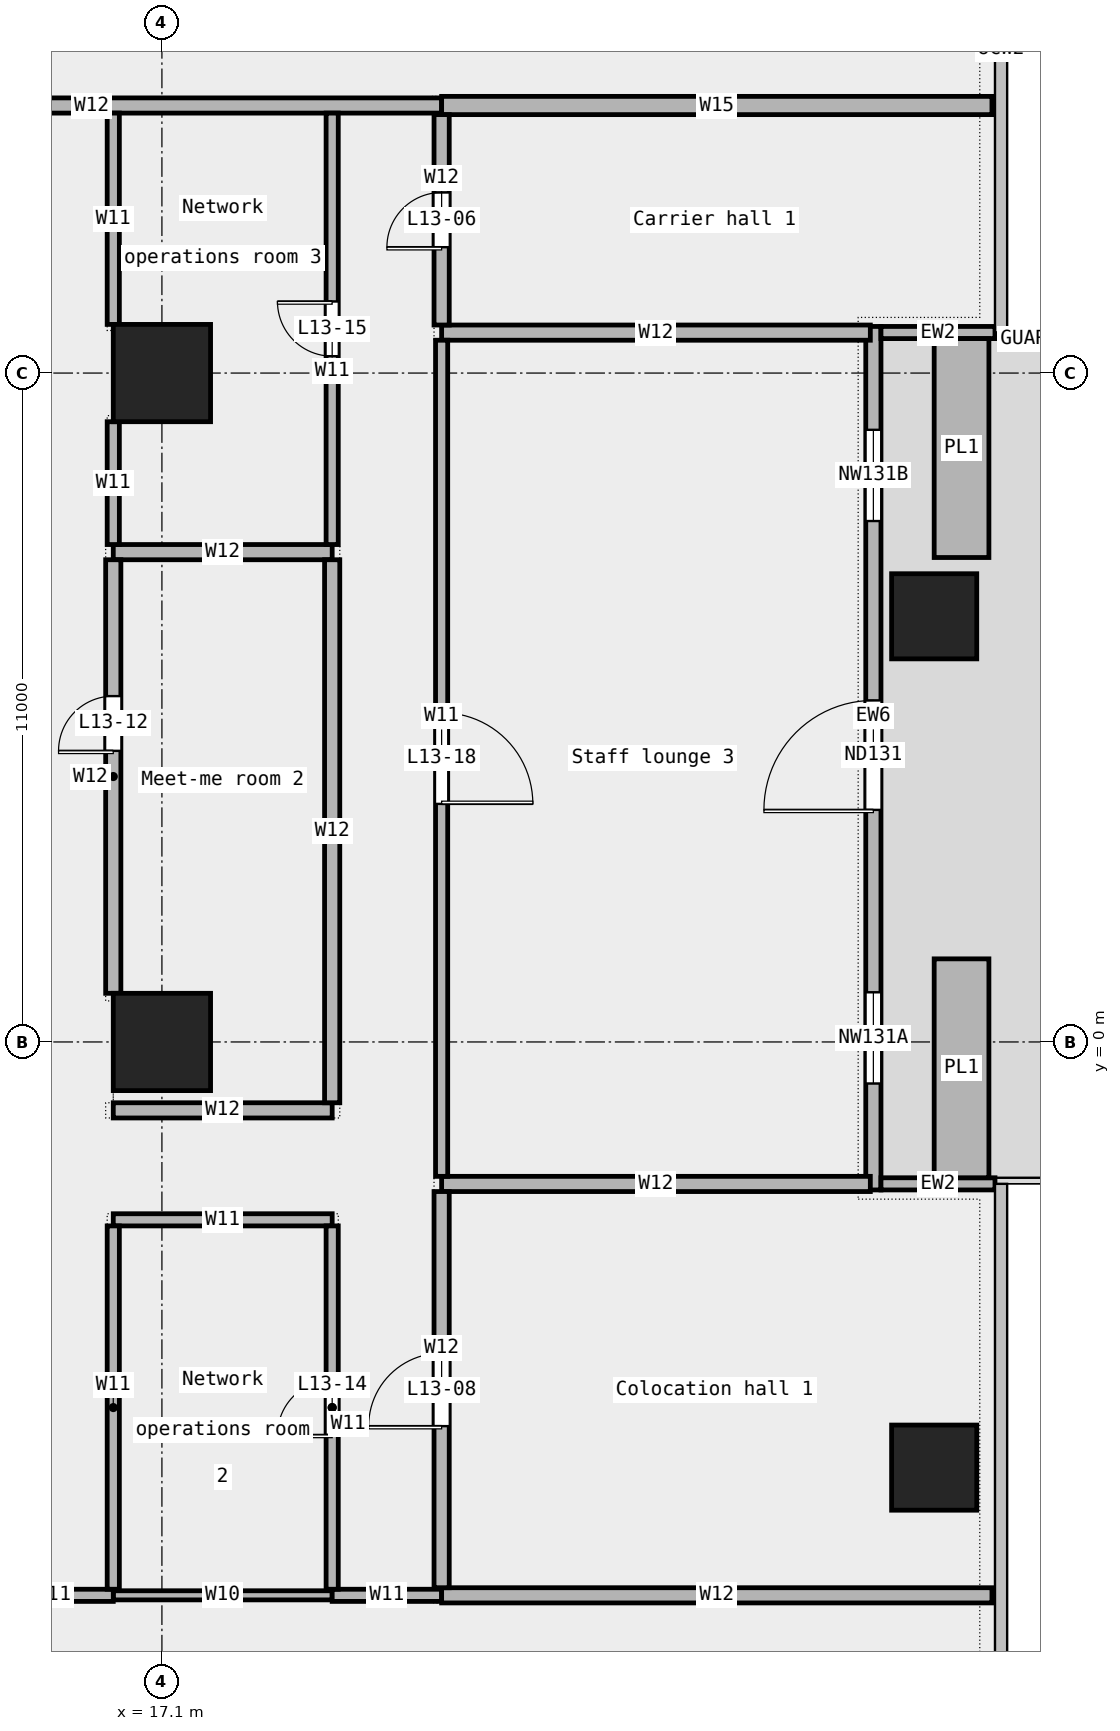
"""IFC4 building model, lengths in metres.
Left out: names, types, materials, properties, quantities, classifications, styles, units other than length and angle.
Written with IfcOpenShell. Run it as: python <this file> out.ifc"""

import sys

from ifc_helpers import new_model, si_unit, direction, frame, frame_2d, origin, origin_2d, place, context, subcontext, project, spatial, rectangle, extrude, element, fill, save


model = new_model("IFC4")
c1 = context("Model", 3, precision=1e-05, world=origin(), true_north=direction((0.0, 1.0)))
c2 = subcontext(c1, "Body", "Model", "MODEL_VIEW")
j1 = project(units=[si_unit("LENGTHUNIT", "METRE"), si_unit("PLANEANGLEUNIT", "RADIAN")], contexts=[c1])
p1 = place(None, origin())
s1 = spatial("IfcSite", under=j1, at=p1, CompositionType="ELEMENT")
p2 = place(p1, origin())
s2 = spatial("IfcBuilding", under=s1, at=p2, CompositionType="ELEMENT")
p3 = place(p2, frame((0.0, 0.0, 69.4)))
s3 = spatial("IfcBuildingStorey", under=s2, at=p3, CompositionType="ELEMENT", Elevation=69.4)
for number, where, z_axis, x_axis in (
    (1, (29.8, -7.0, 0.0), (0.0, 0.0, 1.0), (1.0, 0.0, 0.0)),
    (2, (29.8, 7.0, 0.0), (0.0, 0.0, 1.0), (1.0, 0.0, 0.0)),
):
    element("IfcColumn", number, at=place(p3, frame(where, z_axis=z_axis, x_axis=x_axis)), inside=s3, PredefinedType="COLUMN", context=c2, shape_type="SweptSolid", body=[
        extrude(rectangle(XDim=1.4, YDim=1.4, at=origin_2d()), origin(), (0.0, 0.0, 1.0), 4.35),
    ])
for number, where, z_axis, x_axis in (
    (3, (17.1, 0.0, 0.0), (0.0, 0.0, 1.0), (1.0, 0.0, 0.0)),
    (4, (17.1, 11.0, 0.0), (0.0, 0.0, 1.0), (1.0, 0.0, 0.0)),
):
    element("IfcColumn", number, at=place(p3, frame(where, z_axis=z_axis, x_axis=x_axis)), inside=s3, PredefinedType="COLUMN", context=c2, shape_type="SweptSolid", body=[
        extrude(rectangle(XDim=1.6, YDim=1.6, at=origin_2d()), origin(), (0.0, 0.0, 1.0), 4.35),
    ])
p4 = place(p3, frame((28.8, -2.433, 0.0), z_axis=(0.0, 0.0, 1.0), x_axis=(0.0, 1.0, 0.0)))
e5 = element("IfcWall", 5, at=p4, inside=s3, PredefinedType="STANDARD", context=c2, shape_type="SweptSolid", body=[
    extrude(rectangle(XDim=14.2, YDim=0.25, at=frame_2d((7.1, 0.0))), origin(), (0.0, 0.0, 1.0), 4.35),
])
p5 = place(p4, frame((1.75, 0.0, 0.45)))
e6 = element("IfcOpeningElement", 6, at=p5, cuts=e5, PredefinedType="OPENING", context=c2, shape_type="SweptSolid", body=[
    extrude(rectangle(XDim=1.5, YDim=3.0, at=frame_2d((0.75, 1.5))), frame((0.0, 0.137, 0.0), z_axis=(0.0, -1.0, 0.0), x_axis=(1.0, 0.0, 0.0)), (0.0, 0.0, 1.0), 0.274),
])
p6 = place(p4, frame((6.25, 0.0, 0.0)))
e7 = element("IfcOpeningElement", 7, at=p6, cuts=e5, PredefinedType="OPENING", context=c2, shape_type="SweptSolid", body=[
    extrude(rectangle(XDim=1.8, YDim=2.4, at=frame_2d((0.9, 1.2))), frame((0.0, 0.137, 0.0), z_axis=(0.0, -1.0, 0.0), x_axis=(1.0, 0.0, 0.0)), (0.0, 0.0, 1.0), 0.274),
])
p7 = place(p4, frame((11.0, 0.0, 0.45)))
e8 = element("IfcOpeningElement", 8, at=p7, cuts=e5, PredefinedType="OPENING", context=c2, shape_type="SweptSolid", body=[
    extrude(rectangle(XDim=1.5, YDim=3.0, at=frame_2d((0.75, 1.5))), frame((0.0, 0.137, 0.0), z_axis=(0.0, -1.0, 0.0), x_axis=(1.0, 0.0, 0.0)), (0.0, 0.0, 1.0), 0.274),
])
for number, where, z_axis, x_axis in (
    (9, (30.8, -2.333, 0.0), (0.0, 0.0, 1.0), (-1.0, 0.0, 0.0)),
    (10, (30.8, 11.667, 0.0), (0.0, 0.0, 1.0), (-1.0, 0.0, 0.0)),
):
    element("IfcWall", number, at=place(p3, frame(where, z_axis=z_axis, x_axis=x_axis)), inside=s3, PredefinedType="STANDARD", context=c2, shape_type="SweptSolid", body=[
        extrude(rectangle(XDim=1.875, YDim=0.2, at=frame_2d((0.938, 0.0))), origin(), (0.0, 0.0, 1.0), 4.35),
    ])
for number, where, z_axis, x_axis in (
    (11, (30.25, -2.233, 0.0), (0.0, 0.0, 1.0), (0.0, 1.0, 0.0)),
    (12, (30.25, 7.967, 0.0), (0.0, 0.0, 1.0), (0.0, 1.0, 0.0)),
):
    element("IfcWall", number, at=place(p3, frame(where, z_axis=z_axis, x_axis=x_axis)), inside=s3, PredefinedType="STANDARD", context=c2, shape_type="SweptSolid", body=[
        extrude(rectangle(XDim=3.6, YDim=0.9, at=frame_2d((1.8, 0.0))), origin(), (0.0, 0.0, 1.0), 0.7),
    ])
p8 = place(p3, frame((16.3, -9.1, 0.0), z_axis=(0.0, 0.0, 1.0), x_axis=(1.0, 0.0, 0.0)))
e13 = element("IfcWall", 13, at=p8, inside=s3, PredefinedType="PARTITIONING", context=c2, shape_type="SweptSolid", body=[
    extrude(rectangle(XDim=3.6, YDim=0.15, at=frame_2d((1.8, 0.0))), origin(), (0.0, 0.0, 1.0), 4.35),
])
p9 = place(p3, frame((14.34, -9.1, 0.0), z_axis=(0.0, 0.0, 1.0), x_axis=(1.0, 0.0, 0.0)))
e14 = element("IfcWall", 14, at=p9, inside=s3, PredefinedType="PARTITIONING", context=c2, shape_type="SweptSolid", body=[
    extrude(rectangle(XDim=1.96, YDim=0.2, at=frame_2d((0.98, 0.0))), origin(), (0.0, 0.0, 1.0), 4.35),
])
p10 = place(p3, frame((19.9, -9.1, 0.0), z_axis=(0.0, 0.0, 1.0), x_axis=(1.0, 0.0, 0.0)))
e15 = element("IfcWall", 15, at=p10, inside=s3, PredefinedType="PARTITIONING", context=c2, shape_type="SweptSolid", body=[
    extrude(rectangle(XDim=1.8, YDim=0.2, at=frame_2d((0.9, 0.0))), origin(), (0.0, 0.0, 1.0), 4.35),
])
p11 = place(p3, frame((21.7, -9.1, 0.0), z_axis=(0.0, 0.0, 1.0), x_axis=(1.0, 0.0, 0.0)))
e16 = element("IfcWall", 16, at=p11, inside=s3, PredefinedType="PARTITIONING", context=c2, shape_type="SweptSolid", body=[
    extrude(rectangle(XDim=9.05, YDim=0.25, at=frame_2d((4.525, 0.0))), origin(), (0.0, 0.0, 1.0), 4.35),
])
p12 = place(p3, frame((16.3, -2.925, 0.0), z_axis=(0.0, 0.0, 1.0), x_axis=(1.0, 0.0, 0.0)))
e17 = element("IfcWall", 17, at=p12, inside=s3, PredefinedType="PARTITIONING", context=c2, shape_type="SweptSolid", body=[
    extrude(rectangle(XDim=3.6, YDim=0.2, at=frame_2d((1.8, 0.0))), origin(), (0.0, 0.0, 1.0), 4.35),
])
p13 = place(p3, frame((21.7, -2.335, 0.0), z_axis=(0.0, 0.0, 1.0), x_axis=(1.0, 0.0, 0.0)))
e18 = element("IfcWall", 18, at=p13, inside=s3, PredefinedType="PARTITIONING", context=c2, shape_type="SweptSolid", body=[
    extrude(rectangle(XDim=7.05, YDim=0.25, at=frame_2d((3.525, 0.0))), origin(), (0.0, 0.0, 1.0), 4.35),
])
for number, where, z_axis, x_axis in (
    (19, (16.3, -1.125, 0.0), (0.0, 0.0, 1.0), (1.0, 0.0, 0.0)),
    (20, (16.3, 8.055, 0.0), (0.0, 0.0, 1.0), (1.0, 0.0, 0.0)),
):
    element("IfcWall", number, at=place(p3, frame(where, z_axis=z_axis, x_axis=x_axis)), inside=s3, PredefinedType="PARTITIONING", context=c2, shape_type="SweptSolid", body=[
        extrude(rectangle(XDim=3.6, YDim=0.25, at=frame_2d((1.8, 0.0))), origin(), (0.0, 0.0, 1.0), 4.35),
    ])
p14 = place(p3, frame((21.7, 11.665, 0.0), z_axis=(0.0, 0.0, 1.0), x_axis=(1.0, 0.0, 0.0)))
e21 = element("IfcWall", 21, at=p14, inside=s3, PredefinedType="PARTITIONING", context=c2, shape_type="SweptSolid", body=[
    extrude(rectangle(XDim=7.05, YDim=0.25, at=frame_2d((3.525, 0.0))), origin(), (0.0, 0.0, 1.0), 4.35),
])
p15 = place(p3, frame((10.185, 15.4, 0.0), z_axis=(0.0, 0.0, 1.0), x_axis=(1.0, 0.0, 0.0)))
e22 = element("IfcWall", 22, at=p15, inside=s3, PredefinedType="PARTITIONING", context=c2, shape_type="SweptSolid", body=[
    extrude(rectangle(XDim=11.515, YDim=0.25, at=frame_2d((5.757, 0.0))), origin(), (0.0, 0.0, 1.0), 4.35),
])
p16 = place(p15, frame((2.157, 0.0, 0.0)))
e23 = element("IfcOpeningElement", 23, at=p16, cuts=e22, PredefinedType="OPENING", context=c2, shape_type="SweptSolid", body=[
    extrude(rectangle(XDim=1.8, YDim=2.1, at=frame_2d((0.9, 1.05))), frame((0.0, 0.137, 0.0), z_axis=(0.0, -1.0, 0.0), x_axis=(1.0, 0.0, 0.0)), (0.0, 0.0, 1.0), 0.274),
])
p17 = place(p3, frame((21.7, 15.4, 0.0), z_axis=(0.0, 0.0, 1.0), x_axis=(1.0, 0.0, 0.0)))
e24 = element("IfcWall", 24, at=p17, inside=s3, PredefinedType="PARTITIONING", context=c2, shape_type="SweptSolid", body=[
    extrude(rectangle(XDim=9.05, YDim=0.3, at=frame_2d((4.525, 0.0))), origin(), (0.0, 0.0, 1.0), 4.35),
])
p18 = place(p3, frame((16.3, -9.0, 0.0), z_axis=(0.0, 0.0, 1.0), x_axis=(0.0, 1.0, 0.0)))
e25 = element("IfcWall", 25, at=p18, inside=s3, PredefinedType="PARTITIONING", context=c2, shape_type="SweptSolid", body=[
    extrude(rectangle(XDim=5.975, YDim=0.2, at=frame_2d((2.988, 0.0))), origin(), (0.0, 0.0, 1.0), 4.35),
])
p19 = place(p3, frame((16.3, 8.18, 0.0), z_axis=(0.0, 0.0, 1.0), x_axis=(0.0, 1.0, 0.0)))
e26 = element("IfcWall", 26, at=p19, inside=s3, PredefinedType="PARTITIONING", context=c2, shape_type="SweptSolid", body=[
    extrude(rectangle(XDim=2.02, YDim=0.2, at=frame_2d((1.01, 0.0))), origin(), (0.0, 0.0, 1.0), 4.35),
])
p20 = place(p3, frame((16.3, 11.8, 0.0), z_axis=(0.0, 0.0, 1.0), x_axis=(0.0, 1.0, 0.0)))
e27 = element("IfcWall", 27, at=p20, inside=s3, PredefinedType="PARTITIONING", context=c2, shape_type="SweptSolid", body=[
    extrude(rectangle(XDim=3.475, YDim=0.2, at=frame_2d((1.737, 0.0))), origin(), (0.0, 0.0, 1.0), 4.35),
])
p21 = place(p3, frame((16.3, 0.8, 0.0), z_axis=(0.0, 0.0, 1.0), x_axis=(0.0, 1.0, 0.0)))
e28 = element("IfcWall", 28, at=p21, inside=s3, PredefinedType="PARTITIONING", context=c2, shape_type="SweptSolid", body=[
    extrude(rectangle(XDim=7.13, YDim=0.25, at=frame_2d((3.565, 0.0))), origin(), (0.0, 0.0, 1.0), 4.35),
])
p22 = place(p21, frame((3.988, 0.0, 0.0)))
e29 = element("IfcOpeningElement", 29, at=p22, cuts=e28, PredefinedType="OPENING", context=c2, shape_type="SweptSolid", body=[
    extrude(rectangle(XDim=0.9, YDim=2.1, at=frame_2d((0.45, 1.05))), frame((0.0, 0.137, 0.0), z_axis=(0.0, -1.0, 0.0), x_axis=(1.0, 0.0, 0.0)), (0.0, 0.0, 1.0), 0.274),
])
p23 = place(p3, frame((19.9, -9.0, 0.0), z_axis=(0.0, 0.0, 1.0), x_axis=(0.0, 1.0, 0.0)))
e30 = element("IfcWall", 30, at=p23, inside=s3, PredefinedType="PARTITIONING", context=c2, shape_type="SweptSolid", body=[
    extrude(rectangle(XDim=5.975, YDim=0.2, at=frame_2d((2.988, 0.0))), origin(), (0.0, 0.0, 1.0), 4.35),
])
p24 = place(p23, frame((2.538, 0.0, 0.0)))
e31 = element("IfcOpeningElement", 31, at=p24, cuts=e30, PredefinedType="OPENING", context=c2, shape_type="SweptSolid", body=[
    extrude(rectangle(XDim=0.9, YDim=2.1, at=frame_2d((0.45, 1.05))), frame((0.0, 0.112, 0.0), z_axis=(0.0, -1.0, 0.0), x_axis=(1.0, 0.0, 0.0)), (0.0, 0.0, 1.0), 0.224),
])
p25 = place(p3, frame((19.9, 8.18, 0.0), z_axis=(0.0, 0.0, 1.0), x_axis=(0.0, 1.0, 0.0)))
e32 = element("IfcWall", 32, at=p25, inside=s3, PredefinedType="PARTITIONING", context=c2, shape_type="SweptSolid", body=[
    extrude(rectangle(XDim=7.095, YDim=0.2, at=frame_2d((3.547, 0.0))), origin(), (0.0, 0.0, 1.0), 4.35),
])
p26 = place(p25, frame((3.097, 0.0, 0.0)))
e33 = element("IfcOpeningElement", 33, at=p26, cuts=e32, PredefinedType="OPENING", context=c2, shape_type="SweptSolid", body=[
    extrude(rectangle(XDim=0.9, YDim=2.1, at=frame_2d((0.45, 1.05))), frame((0.0, 0.112, 0.0), z_axis=(0.0, -1.0, 0.0), x_axis=(1.0, 0.0, 0.0)), (0.0, 0.0, 1.0), 0.224),
])
p27 = place(p3, frame((19.9, -1.0, 0.0), z_axis=(0.0, 0.0, 1.0), x_axis=(0.0, 1.0, 0.0)))
e34 = element("IfcWall", 34, at=p27, inside=s3, PredefinedType="PARTITIONING", context=c2, shape_type="SweptSolid", body=[
    extrude(rectangle(XDim=8.93, YDim=0.25, at=frame_2d((4.465, 0.0))), origin(), (0.0, 0.0, 1.0), 4.35),
])
p28 = place(p3, frame((21.7, -2.21, 0.0), z_axis=(0.0, 0.0, 1.0), x_axis=(0.0, 1.0, 0.0)))
e35 = element("IfcWall", 35, at=p28, inside=s3, PredefinedType="PARTITIONING", context=c2, shape_type="SweptSolid", body=[
    extrude(rectangle(XDim=13.75, YDim=0.2, at=frame_2d((6.875, 0.0))), origin(), (0.0, 0.0, 1.0), 4.35),
])
p29 = place(p28, frame((6.125, 0.0, 0.0)))
e36 = element("IfcOpeningElement", 36, at=p29, cuts=e35, PredefinedType="OPENING", context=c2, shape_type="SweptSolid", body=[
    extrude(rectangle(XDim=1.5, YDim=2.1, at=frame_2d((0.75, 1.05))), frame((0.0, 0.112, 0.0), z_axis=(0.0, -1.0, 0.0), x_axis=(1.0, 0.0, 0.0)), (0.0, 0.0, 1.0), 0.224),
])
p30 = place(p3, frame((21.7, -8.975, 0.0), z_axis=(0.0, 0.0, 1.0), x_axis=(0.0, 1.0, 0.0)))
e37 = element("IfcWall", 37, at=p30, inside=s3, PredefinedType="PARTITIONING", context=c2, shape_type="SweptSolid", body=[
    extrude(rectangle(XDim=6.515, YDim=0.25, at=frame_2d((3.258, 0.0))), origin(), (0.0, 0.0, 1.0), 4.35),
])
p31 = place(p30, frame((2.657, 0.0, 0.0)))
e38 = element("IfcOpeningElement", 38, at=p31, cuts=e37, PredefinedType="OPENING", context=c2, shape_type="SweptSolid", body=[
    extrude(rectangle(XDim=1.2, YDim=2.1, at=frame_2d((0.6, 1.05))), frame((0.0, 0.137, 0.0), z_axis=(0.0, -1.0, 0.0), x_axis=(1.0, 0.0, 0.0)), (0.0, 0.0, 1.0), 0.274),
])
p32 = place(p3, frame((21.7, 11.79, 0.0), z_axis=(0.0, 0.0, 1.0), x_axis=(0.0, 1.0, 0.0)))
e39 = element("IfcWall", 39, at=p32, inside=s3, PredefinedType="PARTITIONING", context=c2, shape_type="SweptSolid", body=[
    extrude(rectangle(XDim=3.46, YDim=0.25, at=frame_2d((1.73, 0.0))), origin(), (0.0, 0.0, 1.0), 4.35),
])
p33 = place(p32, frame((1.28, 0.0, 0.0)))
e40 = element("IfcOpeningElement", 40, at=p33, cuts=e39, PredefinedType="OPENING", context=c2, shape_type="SweptSolid", body=[
    extrude(rectangle(XDim=0.9, YDim=2.1, at=frame_2d((0.45, 1.05))), frame((0.0, 0.137, 0.0), z_axis=(0.0, -1.0, 0.0), x_axis=(1.0, 0.0, 0.0)), (0.0, 0.0, 1.0), 0.274),
])
p34 = place(p5, origin())
e41 = element("IfcWindow", 41, at=p34, inside=s3, PartitioningType="SINGLE_PANEL", PredefinedType="WINDOW", context=c2, shape_type="SweptSolid", body=[
    extrude(rectangle(XDim=1.5, YDim=3.0, at=frame_2d((0.75, 1.5))), frame((0.0, 0.03, 0.0), z_axis=(0.0, -1.0, 0.0), x_axis=(1.0, 0.0, 0.0)), (0.0, 0.0, 1.0), 0.06),
])
fill(e6, e41)
p35 = place(p6, origin())
e42 = element("IfcDoor", 42, at=p35, inside=s3, OperationType="DOUBLE_DOOR_SINGLE_SWING", PredefinedType="DOOR", context=c2, shape_type="SweptSolid", body=[
    extrude(rectangle(XDim=1.8, YDim=2.4, at=frame_2d((0.9, 1.2))), frame((0.0, 0.025, 0.0), z_axis=(0.0, -1.0, 0.0), x_axis=(1.0, 0.0, 0.0)), (0.0, 0.0, 1.0), 0.05),
])
fill(e7, e42)
p36 = place(p7, origin())
e43 = element("IfcWindow", 43, at=p36, inside=s3, PartitioningType="SINGLE_PANEL", PredefinedType="WINDOW", context=c2, shape_type="SweptSolid", body=[
    extrude(rectangle(XDim=1.5, YDim=3.0, at=frame_2d((0.75, 1.5))), frame((0.0, 0.03, 0.0), z_axis=(0.0, -1.0, 0.0), x_axis=(1.0, 0.0, 0.0)), (0.0, 0.0, 1.0), 0.06),
])
fill(e8, e43)
p37 = place(p33, origin())
e44 = element("IfcDoor", 44, at=p37, inside=s3, OperationType="SINGLE_SWING_LEFT", PredefinedType="DOOR", context=c2, shape_type="SweptSolid", body=[
    extrude(rectangle(XDim=0.9, YDim=2.1, at=frame_2d((0.45, 1.05))), frame((0.0, 0.025, 0.0), z_axis=(0.0, -1.0, 0.0), x_axis=(1.0, 0.0, 0.0)), (0.0, 0.0, 1.0), 0.05),
])
fill(e40, e44)
p38 = place(p31, origin())
e45 = element("IfcDoor", 45, at=p38, inside=s3, OperationType="SINGLE_SWING_LEFT", PredefinedType="DOOR", context=c2, shape_type="SweptSolid", body=[
    extrude(rectangle(XDim=1.2, YDim=2.1, at=frame_2d((0.6, 1.05))), frame((0.0, 0.025, 0.0), z_axis=(0.0, -1.0, 0.0), x_axis=(1.0, 0.0, 0.0)), (0.0, 0.0, 1.0), 0.05),
])
fill(e38, e45)
p39 = place(p22, origin())
e46 = element("IfcDoor", 46, at=p39, inside=s3, OperationType="SINGLE_SWING_LEFT", PredefinedType="DOOR", context=c2, shape_type="SweptSolid", body=[
    extrude(rectangle(XDim=0.9, YDim=2.1, at=frame_2d((0.45, 1.05))), frame((0.0, 0.025, 0.0), z_axis=(0.0, -1.0, 0.0), x_axis=(1.0, 0.0, 0.0)), (0.0, 0.0, 1.0), 0.05),
])
fill(e29, e46)
p40 = place(p24, origin())
e47 = element("IfcDoor", 47, at=p40, inside=s3, OperationType="SINGLE_SWING_LEFT", PredefinedType="DOOR", context=c2, shape_type="SweptSolid", body=[
    extrude(rectangle(XDim=0.9, YDim=2.1, at=frame_2d((0.45, 1.05))), frame((0.0, 0.025, 0.0), z_axis=(0.0, -1.0, 0.0), x_axis=(1.0, 0.0, 0.0)), (0.0, 0.0, 1.0), 0.05),
])
fill(e31, e47)
p41 = place(p26, origin())
e48 = element("IfcDoor", 48, at=p41, inside=s3, OperationType="SINGLE_SWING_RIGHT", PredefinedType="DOOR", context=c2, shape_type="SweptSolid", body=[
    extrude(rectangle(XDim=0.9, YDim=2.1, at=frame_2d((0.45, 1.05))), frame((0.0, 0.025, 0.0), z_axis=(0.0, -1.0, 0.0), x_axis=(1.0, 0.0, 0.0)), (0.0, 0.0, 1.0), 0.05),
])
fill(e33, e48)
p42 = place(p29, origin())
e49 = element("IfcDoor", 49, at=p42, inside=s3, OperationType="DOUBLE_DOOR_SINGLE_SWING", PredefinedType="DOOR", context=c2, shape_type="SweptSolid", body=[
    extrude(rectangle(XDim=1.5, YDim=2.1, at=frame_2d((0.75, 1.05))), frame((0.0, 0.025, 0.0), z_axis=(0.0, -1.0, 0.0), x_axis=(1.0, 0.0, 0.0)), (0.0, 0.0, 1.0), 0.05),
])
fill(e36, e49)
save(model, sys.argv[1])
